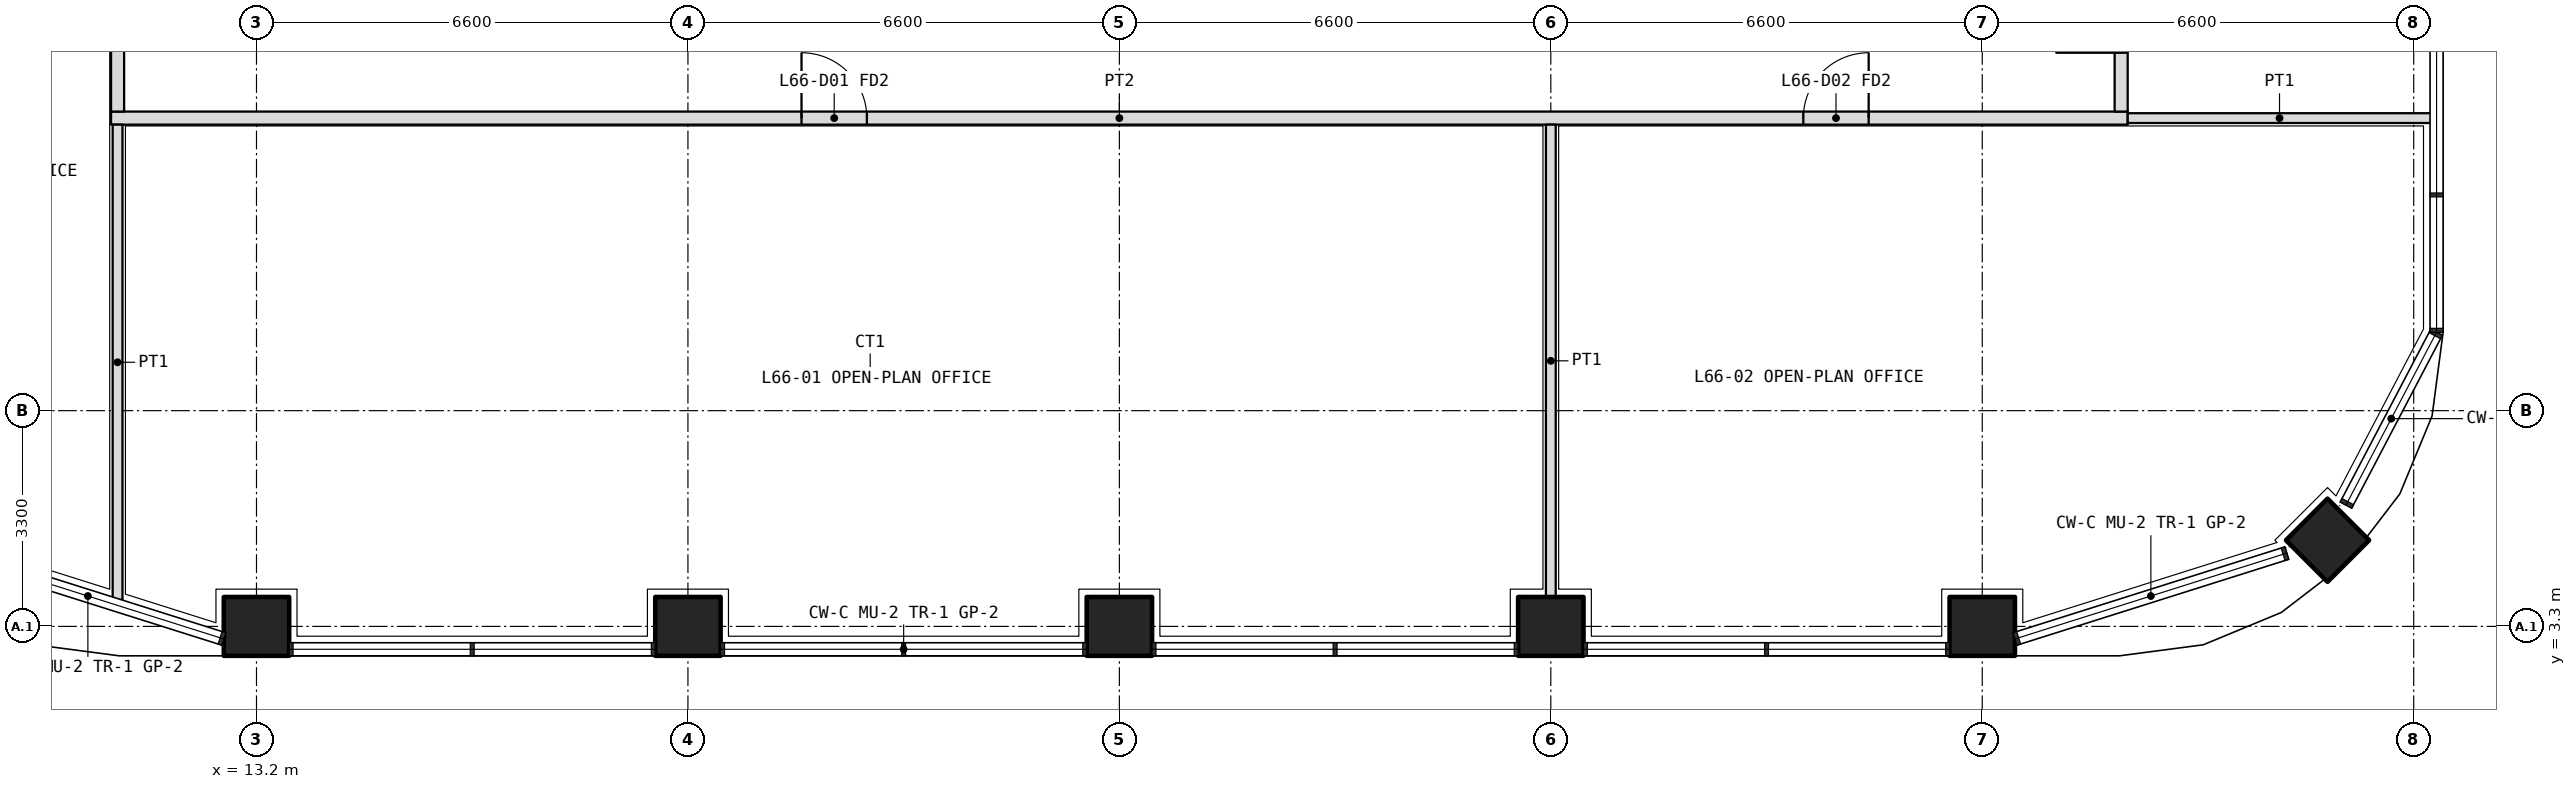
"""IFC4 building model, lengths in metres.
Left out: names, types, materials, properties, quantities, classifications, styles, units other than length and angle.
Written with IfcOpenShell. Run it as: python <this file> out.ifc"""

import sys

from ifc_helpers import new_model, si_unit, direction, frame, frame_2d, origin, origin_2d, place, context, subcontext, project, spatial, rectangle, extrude, element, fill, save


model = new_model("IFC4")
c1 = context("Model", 3, precision=1e-05, world=origin(), true_north=direction((0.0, 1.0)))
c2 = subcontext(c1, "Body", "Model", "MODEL_VIEW")
j1 = project(units=[si_unit("LENGTHUNIT", "METRE"), si_unit("PLANEANGLEUNIT", "RADIAN")], contexts=[c1])
p1 = place(None, origin())
s1 = spatial("IfcSite", under=j1, at=p1, CompositionType="ELEMENT")
p2 = place(p1, origin())
s2 = spatial("IfcBuilding", under=s1, at=p2, CompositionType="ELEMENT")
p3 = place(p2, frame((0.0, 0.0, 288.0)))
s3 = spatial("IfcBuildingStorey", under=s2, at=p3, CompositionType="ELEMENT", Elevation=288.0)
p4 = place(p3, frame((44.882, 4.618, 0.0), z_axis=(0.0, 0.0, 1.0), x_axis=(0.707106781187, 0.707106781187, 0.0)))
e1 = element("IfcColumn", 1, at=p4, inside=s3, PredefinedType="COLUMN", context=c2, shape_type="SweptSolid", body=[
    extrude(rectangle(XDim=0.9, YDim=0.9, at=origin_2d()), origin(), (0.0, 0.0, 1.0), 4.8),
])
for number, where, z_axis, x_axis in (
    (2, (13.2, 3.3, 0.0), (0.0, 0.0, 1.0), (1.0, 0.0, 0.0)),
    (3, (19.8, 3.3, 0.0), (0.0, 0.0, 1.0), (1.0, 0.0, 0.0)),
    (4, (26.4, 3.3, 0.0), (0.0, 0.0, 1.0), (1.0, 0.0, 0.0)),
    (5, (33.0, 3.3, 0.0), (0.0, 0.0, 1.0), (1.0, 0.0, 0.0)),
    (6, (39.6, 3.3, 0.0), (0.0, 0.0, 1.0), (1.0, 0.0, 0.0)),
):
    element("IfcColumn", number, at=place(p3, frame(where, z_axis=z_axis, x_axis=x_axis)), inside=s3, PredefinedType="COLUMN", context=c2, shape_type="SweptSolid", body=[
        extrude(rectangle(XDim=1.0, YDim=0.9, at=origin_2d()), origin(), (0.0, 0.0, 1.0), 4.8),
    ])
p5 = place(p3, frame((10.975, 11.075, 0.0), z_axis=(0.0, 0.0, 1.0), x_axis=(1.0, 0.0, 0.0)))
e7 = element("IfcWall", 7, at=p5, inside=s3, PredefinedType="PARTITIONING", context=c2, shape_type="SweptSolid", body=[
    extrude(rectangle(XDim=30.85, YDim=0.2, at=frame_2d((15.425, 0.0))), origin(), (0.0, 0.0, 1.0), 3.1),
])
p6 = place(p5, frame((10.562, 0.0, 0.0)))
e8 = element("IfcOpeningElement", 8, at=p6, cuts=e7, PredefinedType="OPENING", context=c2, shape_type="SweptSolid", body=[
    extrude(rectangle(XDim=1.0, YDim=2.1, at=frame_2d((0.5, 1.05))), frame((0.0, 0.11, 0.0), z_axis=(0.0, -1.0, 0.0), x_axis=(1.0, 0.0, 0.0)), (0.0, 0.0, 1.0), 0.22),
])
p7 = place(p5, frame((25.887, 0.0, 0.0)))
e9 = element("IfcOpeningElement", 9, at=p7, cuts=e7, PredefinedType="OPENING", context=c2, shape_type="SweptSolid", body=[
    extrude(rectangle(XDim=1.0, YDim=2.1, at=frame_2d((0.5, 1.05))), frame((0.0, 0.11, 0.0), z_axis=(0.0, -1.0, 0.0), x_axis=(1.0, 0.0, 0.0)), (0.0, 0.0, 1.0), 0.22),
])
p8 = place(p3, frame((11.075, 11.175, 0.0), z_axis=(0.0, 0.0, 1.0), x_axis=(0.0, 1.0, 0.0)))
e10 = element("IfcWall", 10, at=p8, inside=s3, PredefinedType="PARTITIONING", context=c2, shape_type="SweptSolid", body=[
    extrude(rectangle(XDim=23.85, YDim=0.2, at=frame_2d((11.925, 0.0))), origin(), (0.0, 0.0, 1.0), 3.1),
])
p9 = place(p8, frame((3.762, 0.0, 0.0)))
e11 = element("IfcOpeningElement", 11, at=p9, cuts=e10, PredefinedType="OPENING", context=c2, shape_type="SweptSolid", body=[
    extrude(rectangle(XDim=1.0, YDim=2.1, at=frame_2d((0.5, 1.05))), frame((0.0, 0.11, 0.0), z_axis=(0.0, -1.0, 0.0), x_axis=(1.0, 0.0, 0.0)), (0.0, 0.0, 1.0), 0.22),
])
p10 = place(p8, frame((9.175, 0.0, 0.0)))
e12 = element("IfcOpeningElement", 12, at=p10, cuts=e10, PredefinedType="OPENING", context=c2, shape_type="SweptSolid", body=[
    extrude(rectangle(XDim=1.0, YDim=2.1, at=frame_2d((0.5, 1.05))), frame((0.0, 0.11, 0.0), z_axis=(0.0, -1.0, 0.0), x_axis=(1.0, 0.0, 0.0)), (0.0, 0.0, 1.0), 0.22),
])
p11 = place(p8, frame((12.275, 0.0, 0.0)))
e13 = element("IfcOpeningElement", 13, at=p11, cuts=e10, PredefinedType="OPENING", context=c2, shape_type="SweptSolid", body=[
    extrude(rectangle(XDim=0.9, YDim=2.1, at=frame_2d((0.45, 1.05))), frame((0.0, 0.11, 0.0), z_axis=(0.0, -1.0, 0.0), x_axis=(1.0, 0.0, 0.0)), (0.0, 0.0, 1.0), 0.22),
])
p12 = place(p8, frame((16.175, 0.0, 0.0)))
e14 = element("IfcOpeningElement", 14, at=p12, cuts=e10, PredefinedType="OPENING", context=c2, shape_type="SweptSolid", body=[
    extrude(rectangle(XDim=0.9, YDim=2.1, at=frame_2d((0.45, 1.05))), frame((0.0, 0.11, 0.0), z_axis=(0.0, -1.0, 0.0), x_axis=(1.0, 0.0, 0.0)), (0.0, 0.0, 1.0), 0.22),
])
p13 = place(p8, frame((20.738, 0.0, 0.0)))
e15 = element("IfcOpeningElement", 15, at=p13, cuts=e10, PredefinedType="OPENING", context=c2, shape_type="SweptSolid", body=[
    extrude(rectangle(XDim=1.0, YDim=2.1, at=frame_2d((0.5, 1.05))), frame((0.0, 0.11, 0.0), z_axis=(0.0, -1.0, 0.0), x_axis=(1.0, 0.0, 0.0)), (0.0, 0.0, 1.0), 0.22),
])
p14 = place(p3, frame((41.725, 11.175, 0.0), z_axis=(0.0, 0.0, 1.0), x_axis=(0.0, 1.0, 0.0)))
e16 = element("IfcWall", 16, at=p14, inside=s3, PredefinedType="PARTITIONING", context=c2, shape_type="SweptSolid", body=[
    extrude(rectangle(XDim=23.85, YDim=0.2, at=frame_2d((11.925, 0.0))), origin(), (0.0, 0.0, 1.0), 3.1),
])
p15 = place(p14, frame((0.9, 0.0, 0.0)))
e17 = element("IfcOpeningElement", 17, at=p15, cuts=e16, PredefinedType="OPENING", context=c2, shape_type="SweptSolid", body=[
    extrude(rectangle(XDim=1.0, YDim=2.1, at=frame_2d((0.5, 1.05))), frame((0.0, 0.11, 0.0), z_axis=(0.0, -1.0, 0.0), x_axis=(1.0, 0.0, 0.0)), (0.0, 0.0, 1.0), 0.22),
])
p16 = place(p14, frame((4.25, 0.0, 0.0)))
e18 = element("IfcOpeningElement", 18, at=p16, cuts=e16, PredefinedType="OPENING", context=c2, shape_type="SweptSolid", body=[
    extrude(rectangle(XDim=0.9, YDim=2.1, at=frame_2d((0.45, 1.05))), frame((0.0, 0.11, 0.0), z_axis=(0.0, -1.0, 0.0), x_axis=(1.0, 0.0, 0.0)), (0.0, 0.0, 1.0), 0.22),
])
p17 = place(p14, frame((10.363, 0.0, 0.0)))
e19 = element("IfcOpeningElement", 19, at=p17, cuts=e16, PredefinedType="OPENING", context=c2, shape_type="SweptSolid", body=[
    extrude(rectangle(XDim=1.0, YDim=2.1, at=frame_2d((0.5, 1.05))), frame((0.0, 0.11, 0.0), z_axis=(0.0, -1.0, 0.0), x_axis=(1.0, 0.0, 0.0)), (0.0, 0.0, 1.0), 0.22),
])
p18 = place(p14, frame((19.087, 0.0, 0.0)))
e20 = element("IfcOpeningElement", 20, at=p18, cuts=e16, PredefinedType="OPENING", context=c2, shape_type="SweptSolid", body=[
    extrude(rectangle(XDim=1.0, YDim=2.1, at=frame_2d((0.5, 1.05))), frame((0.0, 0.11, 0.0), z_axis=(0.0, -1.0, 0.0), x_axis=(1.0, 0.0, 0.0)), (0.0, 0.0, 1.0), 0.22),
])
p19 = place(p3, frame((11.075, 3.705, 0.0), z_axis=(0.0, 0.0, 1.0), x_axis=(0.0, 1.0, 0.0)))
e21 = element("IfcWall", 21, at=p19, inside=s3, PredefinedType="PARTITIONING", context=c2, shape_type="SweptSolid", body=[
    extrude(rectangle(XDim=7.27, YDim=0.15, at=frame_2d((3.635, 0.0))), origin(), (0.0, 0.0, 1.0), 3.1),
])
p20 = place(p3, frame((46.47, 11.075, 0.0), z_axis=(0.0, 0.0, 1.0), x_axis=(-1.0, 0.0, 0.0)))
e22 = element("IfcWall", 22, at=p20, inside=s3, PredefinedType="PARTITIONING", context=c2, shape_type="SweptSolid", body=[
    extrude(rectangle(XDim=4.645, YDim=0.15, at=frame_2d((2.323, 0.0))), origin(), (0.0, 0.0, 1.0), 3.1),
])
p21 = place(p3, frame((33.0, 3.75, 0.0), z_axis=(0.0, 0.0, 1.0), x_axis=(0.0, 1.0, 0.0)))
e23 = element("IfcWall", 23, at=p21, inside=s3, PredefinedType="PARTITIONING", context=c2, shape_type="SweptSolid", body=[
    extrude(rectangle(XDim=7.225, YDim=0.15, at=frame_2d((3.613, 0.0))), origin(), (0.0, 0.0, 1.0), 3.1),
])
p22 = place(p6, origin())
e24 = element("IfcDoor", 24, at=p22, inside=s3, OperationType="SINGLE_SWING_LEFT", PredefinedType="DOOR", context=c2, shape_type="SweptSolid", body=[
    extrude(rectangle(XDim=1.0, YDim=2.1, at=frame_2d((0.5, 1.05))), frame((0.0, 0.025, 0.0), z_axis=(0.0, -1.0, 0.0), x_axis=(1.0, 0.0, 0.0)), (0.0, 0.0, 1.0), 0.05),
])
fill(e8, e24)
p23 = place(p7, origin())
e25 = element("IfcDoor", 25, at=p23, inside=s3, OperationType="SINGLE_SWING_RIGHT", PredefinedType="DOOR", context=c2, shape_type="SweptSolid", body=[
    extrude(rectangle(XDim=1.0, YDim=2.1, at=frame_2d((0.5, 1.05))), frame((0.0, 0.025, 0.0), z_axis=(0.0, -1.0, 0.0), x_axis=(1.0, 0.0, 0.0)), (0.0, 0.0, 1.0), 0.05),
])
fill(e9, e25)
save(model, sys.argv[1])
